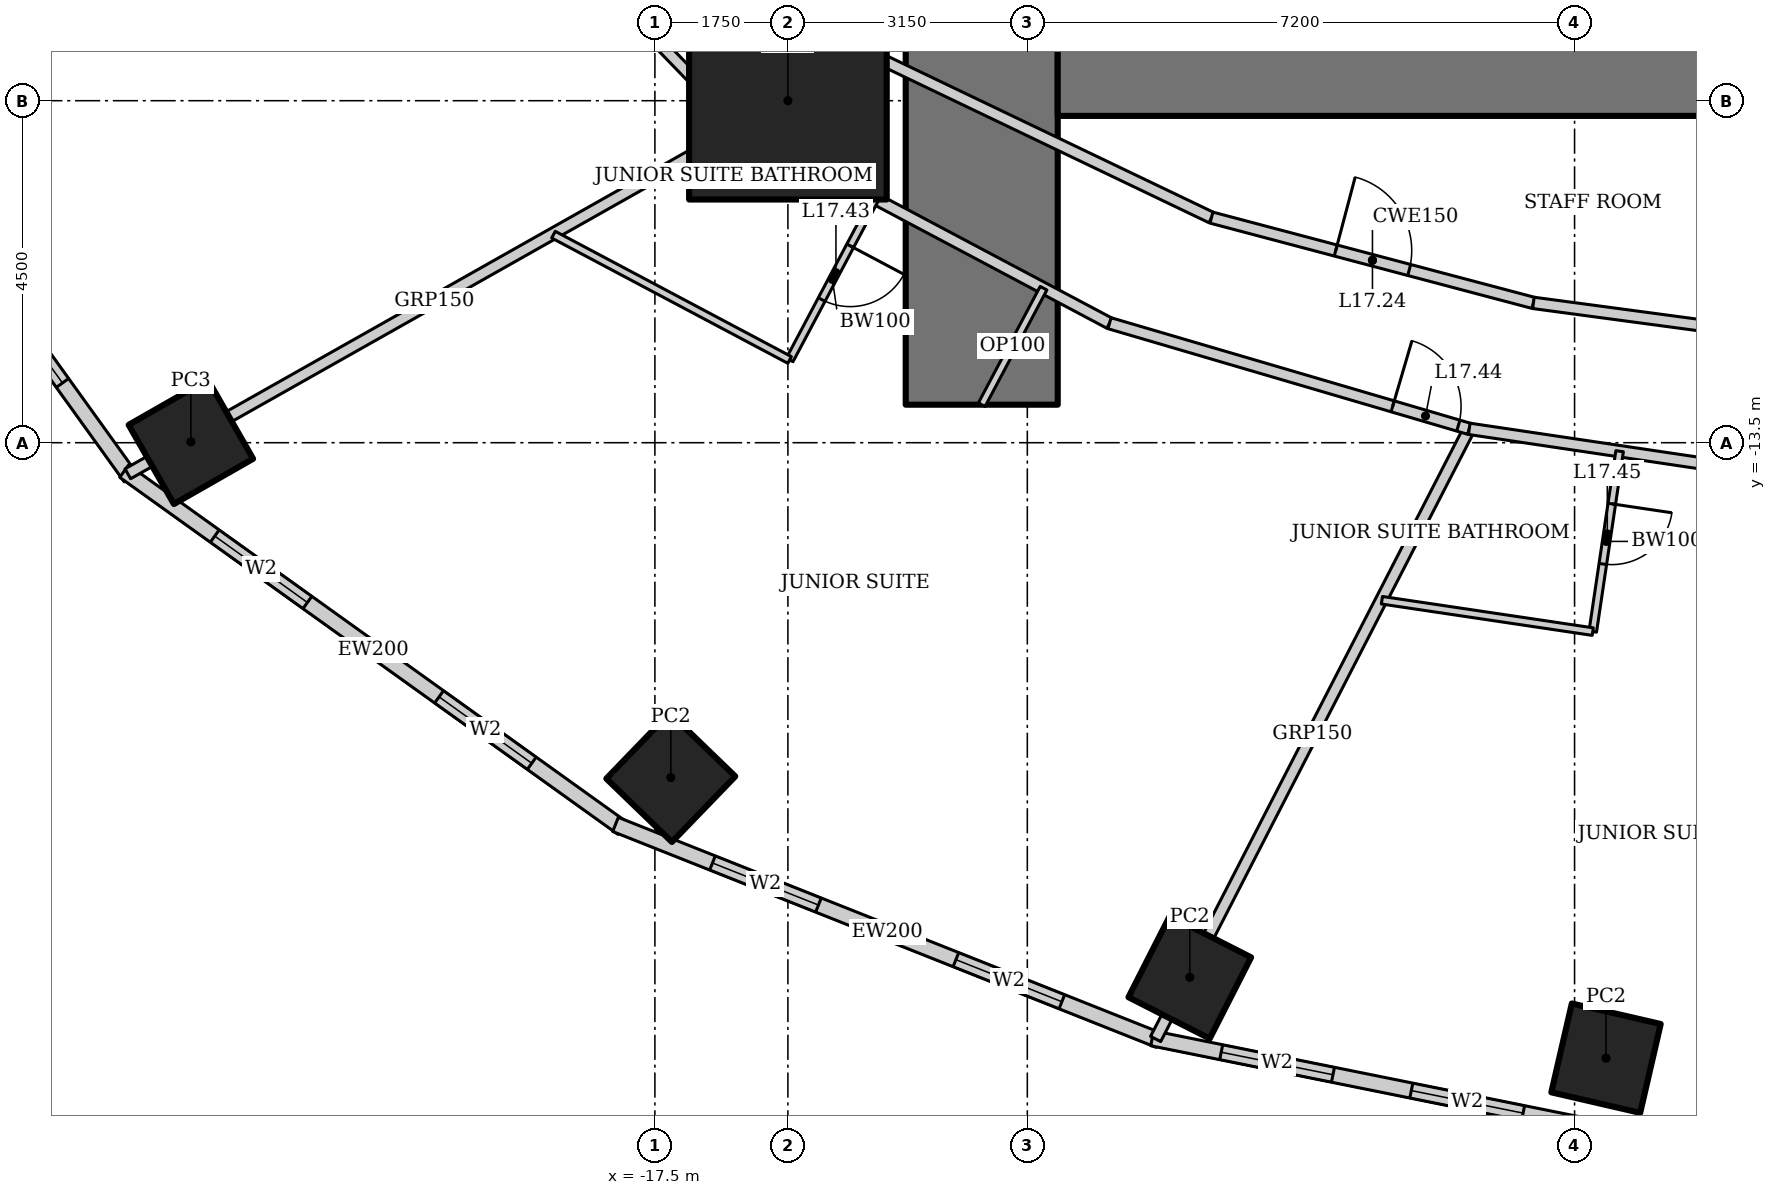
"""IFC4 building model, lengths in metres.
Left out: names, types, materials, properties, quantities, classifications, styles, units other than length and angle.
Written with IfcOpenShell. Run it as: python <this file> out.ifc"""

import sys

from ifc_helpers import new_model, si_unit, direction, frame, frame_2d, origin, origin_2d, place, context, subcontext, project, spatial, rectangle, hollow_rectangle, extrude, element, fill, save


model = new_model("IFC4")
c1 = context("Model", 3, precision=1e-05, world=origin(), true_north=direction((0.0, 1.0)))
c2 = subcontext(c1, "Body", "Model", "MODEL_VIEW")
j1 = project(units=[si_unit("LENGTHUNIT", "METRE"), si_unit("PLANEANGLEUNIT", "RADIAN")], contexts=[c1])
p1 = place(None, origin())
s1 = spatial("IfcSite", under=j1, at=p1, CompositionType="ELEMENT")
p2 = place(p1, origin())
s2 = spatial("IfcBuilding", under=s1, at=p2, CompositionType="ELEMENT")
p3 = place(p2, frame((0.0, 0.0, 76.6)))
s3 = spatial("IfcBuildingStorey", under=s2, at=p3, CompositionType="ELEMENT", Elevation=76.6)
p4 = place(p3, frame((-15.75, -9.0, 0.0), z_axis=(0.0, 0.0, 1.0), x_axis=(1.0, 0.0, 0.0)))
e1 = element("IfcColumn", 1, at=p4, inside=s3, PredefinedType="COLUMN", context=c2, shape_type="SweptSolid", body=[
    extrude(hollow_rectangle(XDim=2.6, YDim=2.6, WallThickness=0.13, at=origin_2d()), origin(), (0.0, 0.0, 1.0), 3.6),
])
p5 = place(p3, frame((-23.605, -13.489, 0.0), z_axis=(0.0, 0.0, 1.0), x_axis=(0.86824298017, 0.496139221777, 0.0)))
e2 = element("IfcColumn", 2, at=p5, inside=s3, PredefinedType="COLUMN", context=c2, shape_type="SweptSolid", body=[
    extrude(hollow_rectangle(XDim=1.2, YDim=1.2, WallThickness=0.12, at=origin_2d()), origin(), (0.0, 0.0, 1.0), 3.6),
])
for number, where, z_axis, x_axis in (
    (3, (-17.291, -17.905, 0.0), (0.0, 0.0, 1.0), (0.695, 0.719, 0.0)),
    (4, (-10.463, -20.534, 0.0), (0.0, 0.0, 1.0), (0.454, 0.891, 0.0)),
    (5, (-4.986, -21.598, 0.0), (0.0, 0.0, 1.0), (0.225, 0.974, 0.0)),
):
    element("IfcColumn", number, at=place(p3, frame(where, z_axis=z_axis, x_axis=x_axis)), inside=s3, PredefinedType="COLUMN", context=c2, shape_type="SweptSolid", body=[
        extrude(hollow_rectangle(XDim=1.2, YDim=1.2, WallThickness=0.1, at=origin_2d()), origin(), (0.0, 0.0, 1.0), 3.6),
    ])
p6 = place(p3, frame((-13.2, 13.0, 0.0), z_axis=(0.0, 0.0, 1.0), x_axis=(0.0, -1.0, 0.0)))
e6 = element("IfcWall", 6, at=p6, inside=s3, PredefinedType="SHEAR", context=c2, shape_type="SweptSolid", body=[
    extrude(rectangle(XDim=26.0, YDim=2.0, at=frame_2d((13.0, 0.0))), origin(), (0.0, 0.0, 1.0), 3.6),
])
p7 = place(p6, frame((12.1, 0.0, 0.0)))
e7 = element("IfcOpeningElement", 7, at=p7, cuts=e6, PredefinedType="OPENING", context=c2, shape_type="SweptSolid", body=[
    extrude(rectangle(XDim=1.8, YDim=2.1, at=frame_2d((0.9, 1.05))), frame((0.0, 1.01, 0.0), z_axis=(0.0, -1.0, 0.0), x_axis=(1.0, 0.0, 0.0)), (0.0, 0.0, 1.0), 2.02),
])
p8 = place(p3, frame((-12.2, -8.0, 0.0), z_axis=(0.0, 0.0, 1.0), x_axis=(1.0, 0.0, 0.0)))
e8 = element("IfcWall", 8, at=p8, inside=s3, PredefinedType="SHEAR", context=c2, shape_type="SweptSolid", body=[
    extrude(rectangle(XDim=24.4, YDim=2.4, at=frame_2d((12.2, 0.0))), origin(), (0.0, 0.0, 1.0), 3.6),
])
p9 = place(p3, frame((-29.26, -7.2, 0.0), z_axis=(0.0, 0.0, 1.0), x_axis=(0.583937613703, -0.811798536155, 0.0)))
e9 = element("IfcWall", 9, at=p9, inside=s3, PredefinedType="SOLIDWALL", context=c2, shape_type="SweptSolid", body=[
    extrude(rectangle(XDim=8.323, YDim=0.2, at=frame_2d((4.162, 0.0))), origin(), (0.0, 0.0, 1.0), 3.45),
])
p10 = place(p9, frame((1.531, 0.0, 0.5)))
e10 = element("IfcOpeningElement", 10, at=p10, cuts=e9, PredefinedType="OPENING", context=c2, shape_type="SweptSolid", body=[
    extrude(rectangle(XDim=1.5, YDim=2.2, at=frame_2d((0.75, 1.1))), frame((0.0, 0.11, 0.0), z_axis=(0.0, -1.0, 0.0), x_axis=(1.0, 0.0, 0.0)), (0.0, 0.0, 1.0), 0.22),
])
p11 = place(p9, frame((5.292, 0.0, 0.5)))
e11 = element("IfcOpeningElement", 11, at=p11, cuts=e9, PredefinedType="OPENING", context=c2, shape_type="SweptSolid", body=[
    extrude(rectangle(XDim=1.5, YDim=2.2, at=frame_2d((0.75, 1.1))), frame((0.0, 0.11, 0.0), z_axis=(0.0, -1.0, 0.0), x_axis=(1.0, 0.0, 0.0)), (0.0, 0.0, 1.0), 0.22),
])
p12 = place(p3, frame((-24.482, -13.875, 0.0), z_axis=(0.0, 0.0, 1.0), x_axis=(0.812791321576, -0.582554948112, 0.0)))
e12 = element("IfcWall", 12, at=p12, inside=s3, PredefinedType="SOLIDWALL", context=c2, shape_type="SweptSolid", body=[
    extrude(rectangle(XDim=8.063, YDim=0.2, at=frame_2d((4.032, 0.0))), origin(), (0.0, 0.0, 1.0), 3.45),
])
p13 = place(p12, frame((1.466, 0.0, 0.5)))
e13 = element("IfcOpeningElement", 13, at=p13, cuts=e12, PredefinedType="OPENING", context=c2, shape_type="SweptSolid", body=[
    extrude(rectangle(XDim=1.5, YDim=2.2, at=frame_2d((0.75, 1.1))), frame((0.0, 0.11, 0.0), z_axis=(0.0, -1.0, 0.0), x_axis=(1.0, 0.0, 0.0)), (0.0, 0.0, 1.0), 0.22),
])
p14 = place(p12, frame((5.097, 0.0, 0.5)))
e14 = element("IfcOpeningElement", 14, at=p14, cuts=e12, PredefinedType="OPENING", context=c2, shape_type="SweptSolid", body=[
    extrude(rectangle(XDim=1.5, YDim=2.2, at=frame_2d((0.75, 1.1))), frame((0.0, 0.11, 0.0), z_axis=(0.0, -1.0, 0.0), x_axis=(1.0, 0.0, 0.0)), (0.0, 0.0, 1.0), 0.22),
])
p15 = place(p3, frame((-18.018, -18.523, 0.0), z_axis=(0.0, 0.0, 1.0), x_axis=(0.929358351251, -0.369178892895, 0.0)))
e15 = element("IfcWall", 15, at=p15, inside=s3, PredefinedType="SOLIDWALL", context=c2, shape_type="SweptSolid", body=[
    extrude(rectangle(XDim=7.692, YDim=0.2, at=frame_2d((3.846, 0.0))), origin(), (0.0, 0.0, 1.0), 3.45),
])
p16 = place(p15, frame((1.373, 0.0, 0.5)))
e16 = element("IfcOpeningElement", 16, at=p16, cuts=e15, PredefinedType="OPENING", context=c2, shape_type="SweptSolid", body=[
    extrude(rectangle(XDim=1.5, YDim=2.2, at=frame_2d((0.75, 1.1))), frame((0.0, 0.11, 0.0), z_axis=(0.0, -1.0, 0.0), x_axis=(1.0, 0.0, 0.0)), (0.0, 0.0, 1.0), 0.22),
])
p17 = place(p15, frame((4.819, 0.0, 0.5)))
e17 = element("IfcOpeningElement", 17, at=p17, cuts=e15, PredefinedType="OPENING", context=c2, shape_type="SweptSolid", body=[
    extrude(rectangle(XDim=1.5, YDim=2.2, at=frame_2d((0.75, 1.1))), frame((0.0, 0.11, 0.0), z_axis=(0.0, -1.0, 0.0), x_axis=(1.0, 0.0, 0.0)), (0.0, 0.0, 1.0), 0.22),
])
p18 = place(p3, frame((-10.957, -21.337, 0.0), z_axis=(0.0, 0.0, 1.0), x_axis=(0.980251657452, -0.197754110105, 0.0)))
e18 = element("IfcWall", 18, at=p18, inside=s3, PredefinedType="SOLIDWALL", context=c2, shape_type="SweptSolid", body=[
    extrude(rectangle(XDim=5.904, YDim=0.2, at=frame_2d((2.952, 0.0))), origin(), (0.0, 0.0, 1.0), 3.45),
])
p19 = place(p18, frame((0.926, 0.0, 0.5)))
e19 = element("IfcOpeningElement", 19, at=p19, cuts=e18, PredefinedType="OPENING", context=c2, shape_type="SweptSolid", body=[
    extrude(rectangle(XDim=1.5, YDim=2.2, at=frame_2d((0.75, 1.1))), frame((0.0, 0.11, 0.0), z_axis=(0.0, -1.0, 0.0), x_axis=(1.0, 0.0, 0.0)), (0.0, 0.0, 1.0), 0.22),
])
p20 = place(p18, frame((3.478, 0.0, 0.5)))
e20 = element("IfcOpeningElement", 20, at=p20, cuts=e18, PredefinedType="OPENING", context=c2, shape_type="SweptSolid", body=[
    extrude(rectangle(XDim=1.5, YDim=2.2, at=frame_2d((0.75, 1.1))), frame((0.0, 0.11, 0.0), z_axis=(0.0, -1.0, 0.0), x_axis=(1.0, 0.0, 0.0)), (0.0, 0.0, 1.0), 0.22),
])
p21 = place(p3, frame((-24.435, -13.909, 0.0), z_axis=(0.0, 0.0, 1.0), x_axis=(0.870744406136, 0.491735883563, 0.0)))
e21 = element("IfcWall", 21, at=p21, inside=s3, PredefinedType="PARTITIONING", context=c2, shape_type="SweptSolid", body=[
    extrude(rectangle(XDim=9.263, YDim=0.15, at=frame_2d((4.631, 0.0))), origin(), (0.0, 0.0, 1.0), 2.693),
])
p22 = place(p3, frame((-10.912, -21.346, 0.0), z_axis=(0.0, 0.0, 1.0), x_axis=(0.457117602022, 0.889406261458, 0.0)))
e22 = element("IfcWall", 22, at=p22, inside=s3, PredefinedType="PARTITIONING", context=c2, shape_type="SweptSolid", body=[
    extrude(rectangle(XDim=9.027, YDim=0.15, at=frame_2d((4.513, 0.0))), origin(), (0.0, 0.0, 1.0), 2.528),
])
p23 = place(p3, frame((-20.484, -5.107, 0.0), z_axis=(0.0, 0.0, 1.0), x_axis=(0.695871090686, -0.71816671125, 0.0)))
e23 = element("IfcWall", 23, at=p23, inside=s3, PredefinedType="PARTITIONING", context=c2, shape_type="SweptSolid", body=[
    extrude(rectangle(XDim=5.913, YDim=0.15, at=frame_2d((2.957, 0.0))), origin(), (0.0, 0.0, 1.0), 3.45),
])
p24 = place(p23, frame((0.15, 0.0, 0.0)))
e24 = element("IfcOpeningElement", 24, at=p24, cuts=e23, PredefinedType="OPENING", context=c2, shape_type="SweptSolid", body=[
    extrude(rectangle(XDim=0.9, YDim=2.1, at=frame_2d((0.45, 1.05))), frame((0.0, 0.085, 0.0), z_axis=(0.0, -1.0, 0.0), x_axis=(1.0, 0.0, 0.0)), (0.0, 0.0, 1.0), 0.17),
])
p25 = place(p3, frame((-16.369, -9.354, 0.0), z_axis=(0.0, 0.0, 1.0), x_axis=(0.883334368785, -0.468743419071, 0.0)))
e25 = element("IfcWall", 25, at=p25, inside=s3, PredefinedType="PARTITIONING", context=c2, shape_type="SweptSolid", body=[
    extrude(rectangle(XDim=5.491, YDim=0.15, at=frame_2d((2.746, 0.0))), origin(), (0.0, 0.0, 1.0), 3.45),
])
p26 = place(p3, frame((-11.519, -11.928, 0.0), z_axis=(0.0, 0.0, 1.0), x_axis=(0.959496227294, -0.281721475589, 0.0)))
e26 = element("IfcWall", 26, at=p26, inside=s3, PredefinedType="PARTITIONING", context=c2, shape_type="SweptSolid", body=[
    extrude(rectangle(XDim=4.933, YDim=0.15, at=frame_2d((2.466, 0.0))), origin(), (0.0, 0.0, 1.0), 3.45),
])
p27 = place(p26, frame((3.883, 0.0, 0.0)))
e27 = element("IfcOpeningElement", 27, at=p27, cuts=e26, PredefinedType="OPENING", context=c2, shape_type="SweptSolid", body=[
    extrude(rectangle(XDim=0.9, YDim=2.1, at=frame_2d((0.45, 1.05))), frame((0.0, 0.085, 0.0), z_axis=(0.0, -1.0, 0.0), x_axis=(1.0, 0.0, 0.0)), (0.0, 0.0, 1.0), 0.17),
])
p28 = place(p3, frame((-6.786, -13.317, 0.0), z_axis=(0.0, 0.0, 1.0), x_axis=(0.989107488999, -0.14719502439, 0.0)))
e28 = element("IfcWall", 28, at=p28, inside=s3, PredefinedType="PARTITIONING", context=c2, shape_type="SweptSolid", body=[
    extrude(rectangle(XDim=3.627, YDim=0.15, at=frame_2d((1.814, 0.0))), origin(), (0.0, 0.0, 1.0), 3.45),
])
p29 = place(p3, frame((-18.672, -4.655, 0.0), z_axis=(0.0, 0.0, 1.0), x_axis=(0.731260145007, -0.682098673452, 0.0)))
e29 = element("IfcWall", 29, at=p29, inside=s3, PredefinedType="PARTITIONING", context=c2, shape_type="SweptSolid", body=[
    extrude(rectangle(XDim=5.468, YDim=0.15, at=frame_2d((2.734, 0.0))), origin(), (0.0, 0.0, 1.0), 3.45),
])
p30 = place(p29, frame((2.234, 0.0, 0.0)))
e30 = element("IfcOpeningElement", 30, at=p30, cuts=e29, PredefinedType="OPENING", context=c2, shape_type="SweptSolid", body=[
    extrude(rectangle(XDim=1.0, YDim=2.1, at=frame_2d((0.5, 1.05))), frame((0.0, 0.085, 0.0), z_axis=(0.0, -1.0, 0.0), x_axis=(1.0, 0.0, 0.0)), (0.0, 0.0, 1.0), 0.17),
])
p31 = place(p3, frame((-14.673, -8.385, 0.0), z_axis=(0.0, 0.0, 1.0), x_axis=(0.901869692799, -0.43200816799, 0.0)))
e31 = element("IfcWall", 31, at=p31, inside=s3, PredefinedType="PARTITIONING", context=c2, shape_type="SweptSolid", body=[
    extrude(rectangle(XDim=4.986, YDim=0.15, at=frame_2d((2.493, 0.0))), origin(), (0.0, 0.0, 1.0), 3.45),
])
p32 = place(p3, frame((-10.177, -10.539, 0.0), z_axis=(0.0, 0.0, 1.0), x_axis=(0.966672790407, -0.256015070428, 0.0)))
e32 = element("IfcWall", 32, at=p32, inside=s3, PredefinedType="PARTITIONING", context=c2, shape_type="SweptSolid", body=[
    extrude(rectangle(XDim=4.382, YDim=0.15, at=frame_2d((2.191, 0.0))), origin(), (0.0, 0.0, 1.0), 3.45),
])
p33 = place(p32, frame((1.691, 0.0, 0.0)))
e33 = element("IfcOpeningElement", 33, at=p33, cuts=e32, PredefinedType="OPENING", context=c2, shape_type="SweptSolid", body=[
    extrude(rectangle(XDim=1.0, YDim=2.1, at=frame_2d((0.5, 1.05))), frame((0.0, 0.085, 0.0), z_axis=(0.0, -1.0, 0.0), x_axis=(1.0, 0.0, 0.0)), (0.0, 0.0, 1.0), 0.17),
])
p34 = place(p3, frame((-5.941, -11.66, 0.0), z_axis=(0.0, 0.0, 1.0), x_axis=(0.991129053928, -0.13290296633, 0.0)))
e34 = element("IfcWall", 34, at=p34, inside=s3, PredefinedType="PARTITIONING", context=c2, shape_type="SweptSolid", body=[
    extrude(rectangle(XDim=3.18, YDim=0.15, at=frame_2d((1.59, 0.0))), origin(), (0.0, 0.0, 1.0), 3.45),
])
p35 = place(p3, frame((-14.602, -10.291, 0.0), z_axis=(0.0, 0.0, 1.0), x_axis=(-0.468770886208, -0.883319792739, 0.0)))
e35 = element("IfcWall", 35, at=p35, inside=s3, PredefinedType="PARTITIONING", context=c2, shape_type="SweptSolid", body=[
    extrude(rectangle(XDim=2.4, YDim=0.1, at=frame_2d((1.2, 0.0))), origin(), (0.0, 0.0, 1.0), 3.45),
])
p36 = place(p35, frame((0.7, 0.0, 0.0)))
e36 = element("IfcOpeningElement", 36, at=p36, cuts=e35, PredefinedType="OPENING", context=c2, shape_type="SweptSolid", body=[
    extrude(rectangle(XDim=0.8, YDim=2.1, at=frame_2d((0.4, 1.05))), frame((0.0, 0.06, 0.0), z_axis=(0.0, -1.0, 0.0), x_axis=(1.0, 0.0, 0.0)), (0.0, 0.0, 1.0), 0.12),
])
p37 = place(p3, frame((-15.727, -12.411, 0.0), z_axis=(0.0, 0.0, 1.0), x_axis=(-0.88335195308, 0.468710280439, 0.0)))
e37 = element("IfcWall", 37, at=p37, inside=s3, PredefinedType="PARTITIONING", context=c2, shape_type="SweptSolid", body=[
    extrude(rectangle(XDim=3.518, YDim=0.1, at=frame_2d((1.759, 0.0))), origin(), (0.0, 0.0, 1.0), 3.45),
])
p38 = place(p3, frame((-4.807, -13.612, 0.0), z_axis=(0.0, 0.0, 1.0), x_axis=(-0.147201193874, -0.989106570862, 0.0)))
e38 = element("IfcWall", 38, at=p38, inside=s3, PredefinedType="PARTITIONING", context=c2, shape_type="SweptSolid", body=[
    extrude(rectangle(XDim=2.4, YDim=0.1, at=frame_2d((1.2, 0.0))), origin(), (0.0, 0.0, 1.0), 3.45),
])
p39 = place(p38, frame((0.7, 0.0, 0.0)))
e39 = element("IfcOpeningElement", 39, at=p39, cuts=e38, PredefinedType="OPENING", context=c2, shape_type="SweptSolid", body=[
    extrude(rectangle(XDim=0.8, YDim=2.1, at=frame_2d((0.4, 1.05))), frame((0.0, 0.06, 0.0), z_axis=(0.0, -1.0, 0.0), x_axis=(1.0, 0.0, 0.0)), (0.0, 0.0, 1.0), 0.12),
])
p40 = place(p3, frame((-5.161, -15.986, 0.0), z_axis=(0.0, 0.0, 1.0), x_axis=(-0.98910744157, 0.147195343104, 0.0)))
e40 = element("IfcWall", 40, at=p40, inside=s3, PredefinedType="PARTITIONING", context=c2, shape_type="SweptSolid", body=[
    extrude(rectangle(XDim=2.805, YDim=0.1, at=frame_2d((1.402, 0.0))), origin(), (0.0, 0.0, 1.0), 3.45),
])
p41 = place(p3, frame((-13.2, -13.0, 0.0), z_axis=(0.0, 0.0, 1.0), x_axis=(0.46874717052, 0.88333237806, 0.0)))
e41 = element("IfcWall", 41, at=p41, inside=s3, PredefinedType="PARTITIONING", context=c2, shape_type="SweptSolid", body=[
    extrude(rectangle(XDim=1.735, YDim=0.1, at=frame_2d((0.868, 0.0))), origin(), (0.0, 0.0, 1.0), 3.45),
])
p42 = place(p11, origin())
e42 = element("IfcWindow", 42, at=p42, inside=s3, PartitioningType="SINGLE_PANEL", PredefinedType="WINDOW", context=c2, shape_type="SweptSolid", body=[
    extrude(rectangle(XDim=1.5, YDim=2.2, at=frame_2d((0.75, 1.1))), frame((0.0, 0.03, 0.0), z_axis=(0.0, -1.0, 0.0), x_axis=(1.0, 0.0, 0.0)), (0.0, 0.0, 1.0), 0.06),
])
fill(e11, e42)
p43 = place(p13, origin())
e43 = element("IfcWindow", 43, at=p43, inside=s3, PartitioningType="SINGLE_PANEL", PredefinedType="WINDOW", context=c2, shape_type="SweptSolid", body=[
    extrude(rectangle(XDim=1.5, YDim=2.2, at=frame_2d((0.75, 1.1))), frame((0.0, 0.03, 0.0), z_axis=(0.0, -1.0, 0.0), x_axis=(1.0, 0.0, 0.0)), (0.0, 0.0, 1.0), 0.06),
])
fill(e13, e43)
p44 = place(p14, origin())
e44 = element("IfcWindow", 44, at=p44, inside=s3, PartitioningType="SINGLE_PANEL", PredefinedType="WINDOW", context=c2, shape_type="SweptSolid", body=[
    extrude(rectangle(XDim=1.5, YDim=2.2, at=frame_2d((0.75, 1.1))), frame((0.0, 0.03, 0.0), z_axis=(0.0, -1.0, 0.0), x_axis=(1.0, 0.0, 0.0)), (0.0, 0.0, 1.0), 0.06),
])
fill(e14, e44)
p45 = place(p16, origin())
e45 = element("IfcWindow", 45, at=p45, inside=s3, PartitioningType="SINGLE_PANEL", PredefinedType="WINDOW", context=c2, shape_type="SweptSolid", body=[
    extrude(rectangle(XDim=1.5, YDim=2.2, at=frame_2d((0.75, 1.1))), frame((0.0, 0.03, 0.0), z_axis=(0.0, -1.0, 0.0), x_axis=(1.0, 0.0, 0.0)), (0.0, 0.0, 1.0), 0.06),
])
fill(e16, e45)
p46 = place(p17, origin())
e46 = element("IfcWindow", 46, at=p46, inside=s3, PartitioningType="SINGLE_PANEL", PredefinedType="WINDOW", context=c2, shape_type="SweptSolid", body=[
    extrude(rectangle(XDim=1.5, YDim=2.2, at=frame_2d((0.75, 1.1))), frame((0.0, 0.03, 0.0), z_axis=(0.0, -1.0, 0.0), x_axis=(1.0, 0.0, 0.0)), (0.0, 0.0, 1.0), 0.06),
])
fill(e17, e46)
p47 = place(p19, origin())
e47 = element("IfcWindow", 47, at=p47, inside=s3, PartitioningType="SINGLE_PANEL", PredefinedType="WINDOW", context=c2, shape_type="SweptSolid", body=[
    extrude(rectangle(XDim=1.5, YDim=2.2, at=frame_2d((0.75, 1.1))), frame((0.0, 0.03, 0.0), z_axis=(0.0, -1.0, 0.0), x_axis=(1.0, 0.0, 0.0)), (0.0, 0.0, 1.0), 0.06),
])
fill(e19, e47)
p48 = place(p20, origin())
e48 = element("IfcWindow", 48, at=p48, inside=s3, PartitioningType="SINGLE_PANEL", PredefinedType="WINDOW", context=c2, shape_type="SweptSolid", body=[
    extrude(rectangle(XDim=1.5, YDim=2.2, at=frame_2d((0.75, 1.1))), frame((0.0, 0.03, 0.0), z_axis=(0.0, -1.0, 0.0), x_axis=(1.0, 0.0, 0.0)), (0.0, 0.0, 1.0), 0.06),
])
fill(e20, e48)
p49 = place(p33, origin())
e49 = element("IfcDoor", 49, at=p49, inside=s3, OperationType="SINGLE_SWING_LEFT", PredefinedType="DOOR", context=c2, shape_type="SweptSolid", body=[
    extrude(rectangle(XDim=1.0, YDim=2.1, at=frame_2d((0.5, 1.05))), frame((0.0, 0.025, 0.0), z_axis=(0.0, -1.0, 0.0), x_axis=(1.0, 0.0, 0.0)), (0.0, 0.0, 1.0), 0.05),
])
fill(e33, e49)
p50 = place(p36, origin())
e50 = element("IfcDoor", 50, at=p50, inside=s3, OperationType="SINGLE_SWING_LEFT", PredefinedType="DOOR", context=c2, shape_type="SweptSolid", body=[
    extrude(rectangle(XDim=0.8, YDim=2.1, at=frame_2d((0.4, 1.05))), frame((0.0, 0.025, 0.0), z_axis=(0.0, -1.0, 0.0), x_axis=(1.0, 0.0, 0.0)), (0.0, 0.0, 1.0), 0.05),
])
fill(e36, e50)
p51 = place(p27, origin())
e51 = element("IfcDoor", 51, at=p51, inside=s3, OperationType="SINGLE_SWING_LEFT", PredefinedType="DOOR", context=c2, shape_type="SweptSolid", body=[
    extrude(rectangle(XDim=0.9, YDim=2.1, at=frame_2d((0.45, 1.05))), frame((0.0, 0.025, 0.0), z_axis=(0.0, -1.0, 0.0), x_axis=(1.0, 0.0, 0.0)), (0.0, 0.0, 1.0), 0.05),
])
fill(e27, e51)
p52 = place(p39, origin())
e52 = element("IfcDoor", 52, at=p52, inside=s3, OperationType="SINGLE_SWING_LEFT", PredefinedType="DOOR", context=c2, shape_type="SweptSolid", body=[
    extrude(rectangle(XDim=0.8, YDim=2.1, at=frame_2d((0.4, 1.05))), frame((0.0, 0.025, 0.0), z_axis=(0.0, -1.0, 0.0), x_axis=(1.0, 0.0, 0.0)), (0.0, 0.0, 1.0), 0.05),
])
fill(e39, e52)
save(model, sys.argv[1])
